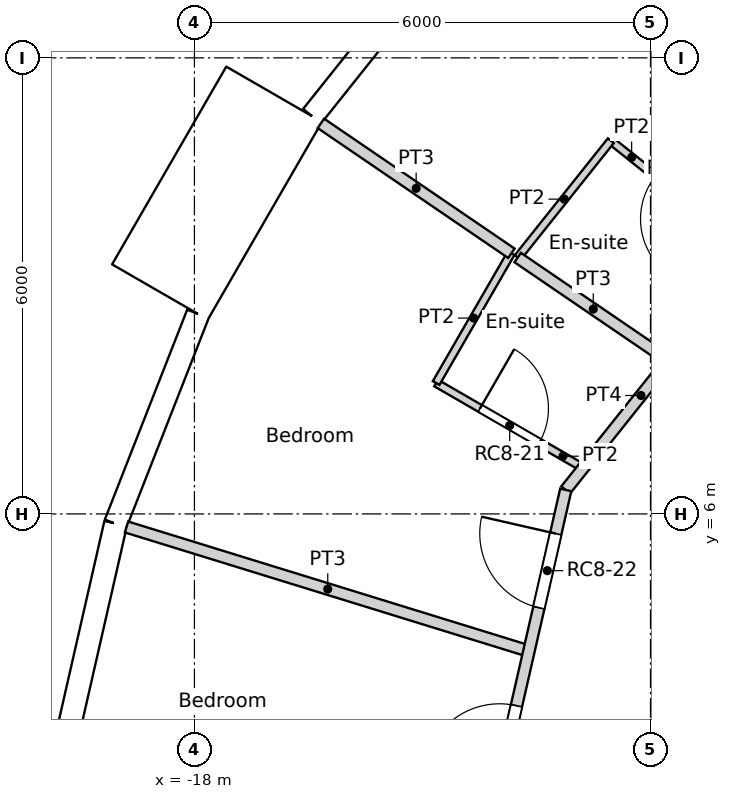
"""IFC4 building model, lengths in metres.
Left out: names, types, materials, properties, quantities, classifications, styles, units other than length and angle.
Written with IfcOpenShell. Run it as: python <this file> out.ifc"""

import sys

from ifc_helpers import new_model, si_unit, direction, frame, frame_2d, origin, origin_2d, place, context, subcontext, project, spatial, rectangle, circle, extrude, element, fill, save


model = new_model("IFC4")
c1 = context("Model", 3, precision=1e-05, world=origin(), true_north=direction((0.0, 1.0)))
c2 = subcontext(c1, "Body", "Model", "MODEL_VIEW")
j1 = project(units=[si_unit("LENGTHUNIT", "METRE"), si_unit("PLANEANGLEUNIT", "RADIAN")], contexts=[c1])
p1 = place(None, origin())
s1 = spatial("IfcSite", under=j1, at=p1, CompositionType="ELEMENT")
p2 = place(p1, origin())
s2 = spatial("IfcBuilding", under=s1, at=p2, CompositionType="ELEMENT")
p3 = place(p2, frame((0.0, 0.0, 305.4)))
s3 = spatial("IfcBuildingStorey", under=s2, at=p3, CompositionType="ELEMENT", Elevation=305.4)
p4 = place(p3, frame((-16.958, 8.167, 0.0), z_axis=(0.0, 0.0, 1.0), x_axis=(1.0, 0.0, 0.0)))
e1 = element("IfcColumn", 1, at=p4, inside=s3, PredefinedType="COLUMN", context=c2, shape_type="SweptSolid", body=[
    extrude(circle(Radius=0.45, at=origin_2d()), origin(), (0.0, 0.0, 1.0), 3.6),
])
p5 = place(p3, frame((-14.604, 13.55, 0.0), z_axis=(0.0, 0.0, 1.0), x_axis=(-0.623498236992, -0.781824755599, 0.0)))
e2 = element("IfcWall", 2, at=p5, inside=s3, PredefinedType="SOLIDWALL", context=c2, shape_type="SweptSolid", body=[
    extrude(rectangle(XDim=2.962, YDim=0.3, at=frame_2d((1.481, 0.0))), origin(), (0.0, 0.0, 1.0), 3.25),
])
p6 = place(p5, frame((1.481, 0.0, 1.55)))
e3 = element("IfcOpeningElement", 3, at=p6, cuts=e2, PredefinedType="OPENING", context=c2, shape_type="SweptSolid", body=[
    extrude(circle(Radius=0.9, at=origin_2d()), frame((0.0, 0.16, 0.0), z_axis=(0.0, -1.0, 0.0), x_axis=(1.0, 0.0, 0.0)), (0.0, 0.0, 1.0), 0.32),
])
p7 = place(p3, frame((-16.952, 11.52, -0.35), z_axis=(0.0, 0.0, 1.0), x_axis=(-0.499990139034, -0.866031096941, 0.0)))
e4 = element("IfcWall", 4, at=p7, inside=s3, PredefinedType="ELEMENTEDWALL", context=c2, shape_type="SweptSolid", body=[
    extrude(rectangle(XDim=3.0, YDim=1.45, at=frame_2d((1.5, 0.0))), origin(), (0.0, 0.0, 1.0), 3.6),
])
p8 = place(p7, frame((1.5, 0.0, 1.9)))
e5 = element("IfcOpeningElement", 5, at=p8, cuts=e4, PredefinedType="OPENING", context=c2, shape_type="SweptSolid", body=[
    extrude(circle(Radius=0.9, at=origin_2d()), frame((0.0, 0.735, 0.0), z_axis=(0.0, -1.0, 0.0), x_axis=(1.0, 0.0, 0.0)), (0.0, 0.0, 1.0), 1.47),
])
p9 = place(p3, frame((-17.955, 8.629, 0.0), z_axis=(0.0, 0.0, 1.0), x_axis=(-0.36530043032, -0.930889679612, 0.0)))
e6 = element("IfcWall", 6, at=p9, inside=s3, PredefinedType="SOLIDWALL", context=c2, shape_type="SweptSolid", body=[
    extrude(rectangle(XDim=2.962, YDim=0.3, at=frame_2d((1.481, 0.0))), origin(), (0.0, 0.0, 1.0), 2.8),
])
p10 = place(p9, frame((1.481, 0.0, 1.55)))
e7 = element("IfcOpeningElement", 7, at=p10, cuts=e6, PredefinedType="OPENING", context=c2, shape_type="SweptSolid", body=[
    extrude(circle(Radius=0.9, at=origin_2d()), frame((0.0, 0.16, 0.0), z_axis=(0.0, -1.0, 0.0), x_axis=(1.0, 0.0, 0.0)), (0.0, 0.0, 1.0), 0.32),
])
p11 = place(p3, frame((-19.037, 5.872, 0.0), z_axis=(0.0, 0.0, 1.0), x_axis=(-0.222529389789, -0.974925982155, 0.0)))
e8 = element("IfcWall", 8, at=p11, inside=s3, PredefinedType="SOLIDWALL", context=c2, shape_type="SweptSolid", body=[
    extrude(rectangle(XDim=2.962, YDim=0.3, at=frame_2d((1.481, 0.0))), origin(), (0.0, 0.0, 1.0), 3.25),
])
p12 = place(p11, frame((1.481, 0.0, 1.55)))
e9 = element("IfcOpeningElement", 9, at=p12, cuts=e8, PredefinedType="OPENING", context=c2, shape_type="SweptSolid", body=[
    extrude(circle(Radius=0.9, at=origin_2d()), frame((0.0, 0.16, 0.0), z_axis=(0.0, -1.0, 0.0), x_axis=(1.0, 0.0, 0.0)), (0.0, 0.0, 1.0), 0.32),
])
p13 = place(p3, frame((-13.115, 6.316, 0.0), z_axis=(0.0, 0.0, 1.0), x_axis=(0.623560523309, 0.781775078761, 0.0)))
e10 = element("IfcWall", 10, at=p13, inside=s3, PredefinedType="PARTITIONING", context=c2, shape_type="SweptSolid", body=[
    extrude(rectangle(XDim=3.177, YDim=0.15, at=frame_2d((1.589, 0.0))), origin(), (0.0, 0.0, 1.0), 3.25),
])
p14 = place(p3, frame((-14.557, 0.0, 0.0), z_axis=(0.0, 0.0, 1.0), x_axis=(0.222533159771, 0.974925121639, 0.0)))
e11 = element("IfcWall", 11, at=p14, inside=s3, PredefinedType="PARTITIONING", context=c2, shape_type="SweptSolid", body=[
    extrude(rectangle(XDim=6.478, YDim=0.15, at=frame_2d((3.239, 0.0))), origin(), (0.0, 0.0, 1.0), 3.25),
])
p15 = place(p14, frame((4.889, 0.0, 0.0)))
e12 = element("IfcOpeningElement", 12, at=p15, cuts=e11, PredefinedType="OPENING", context=c2, shape_type="SweptSolid", body=[
    extrude(rectangle(XDim=1.0, YDim=2.1, at=frame_2d((0.5, 1.05))), frame((0.0, 0.075, 0.0), z_axis=(0.0, -1.0, 0.0), x_axis=(1.0, 0.0, 0.0)), (0.0, 0.0, 1.0), 0.15),
])
p16 = place(p14, frame((2.567, 0.0, 0.0)))
e13 = element("IfcOpeningElement", 13, at=p16, cuts=e11, PredefinedType="OPENING", context=c2, shape_type="SweptSolid", body=[
    extrude(rectangle(XDim=1.0, YDim=2.1, at=frame_2d((0.5, 1.05))), frame((0.0, 0.075, 0.0), z_axis=(0.0, -1.0, 0.0), x_axis=(1.0, 0.0, 0.0)), (0.0, 0.0, 1.0), 0.15),
])
p17 = place(p3, frame((-12.327, 15.458, 0.0), z_axis=(0.0, 0.0, 1.0), x_axis=(0.623460949534, -0.781854490558, 0.0)))
e14 = element("IfcWall", 14, at=p17, inside=s3, PredefinedType="PARTITIONING", context=c2, shape_type="SweptSolid", body=[
    extrude(rectangle(XDim=5.214, YDim=0.15, at=frame_2d((2.607, 0.0))), origin(), (0.0, 0.0, 1.0), 3.25),
])
p18 = place(p3, frame((-12.522, 10.91, 0.0), z_axis=(0.0, 0.0, 1.0), x_axis=(0.781830263661, -0.623491330191, 0.0)))
e15 = element("IfcWall", 15, at=p18, inside=s3, PredefinedType="PARTITIONING", context=c2, shape_type="SweptSolid", body=[
    extrude(rectangle(XDim=2.401, YDim=0.1, at=frame_2d((1.2, 0.0))), origin(), (0.0, 0.0, 1.0), 3.25),
])
p19 = place(p18, frame((0.751, 0.0, 0.0)))
e16 = element("IfcOpeningElement", 16, at=p19, cuts=e15, PredefinedType="OPENING", context=c2, shape_type="SweptSolid", body=[
    extrude(rectangle(XDim=0.9, YDim=2.04, at=frame_2d((0.45, 1.02))), frame((0.0, 0.05, 0.0), z_axis=(0.0, -1.0, 0.0), x_axis=(1.0, 0.0, 0.0)), (0.0, 0.0, 1.0), 0.1),
])
p20 = place(p3, frame((-13.747, 9.373, 0.0), z_axis=(0.0, 0.0, 1.0), x_axis=(0.623330716607, 0.781958322249, 0.0)))
e17 = element("IfcWall", 17, at=p20, inside=s3, PredefinedType="PARTITIONING", context=c2, shape_type="SweptSolid", body=[
    extrude(rectangle(XDim=1.965, YDim=0.1, at=frame_2d((0.983, 0.0))), origin(), (0.0, 0.0, 1.0), 3.25),
])
p21 = place(p3, frame((-16.336, 11.138, 0.0), z_axis=(0.0, 0.0, 1.0), x_axis=(0.826159220299, -0.563436724678, 0.0)))
e18 = element("IfcWall", 18, at=p21, inside=s3, PredefinedType="PARTITIONING", context=c2, shape_type="SweptSolid", body=[
    extrude(rectangle(XDim=3.033, YDim=0.15, at=frame_2d((1.517, 0.0))), origin(), (0.0, 0.0, 1.0), 3.25),
])
p22 = place(p3, frame((-13.747, 9.373, 0.0), z_axis=(0.0, 0.0, 1.0), x_axis=(0.826135036312, -0.563472183677, 0.0)))
e19 = element("IfcWall", 19, at=p22, inside=s3, PredefinedType="PARTITIONING", context=c2, shape_type="SweptSolid", body=[
    extrude(rectangle(XDim=2.406, YDim=0.15, at=frame_2d((1.203, 0.0))), origin(), (0.0, 0.0, 1.0), 3.25),
])
p23 = place(p3, frame((-14.82, 7.722, 0.0), z_axis=(0.0, 0.0, 1.0), x_axis=(0.500143626598, 0.865942465048, 0.0)))
e20 = element("IfcWall", 20, at=p23, inside=s3, PredefinedType="PARTITIONING", context=c2, shape_type="SweptSolid", body=[
    extrude(rectangle(XDim=1.974, YDim=0.1, at=frame_2d((0.987, 0.0))), origin(), (0.0, 0.0, 1.0), 3.25),
])
p24 = place(p3, frame((-14.82, 7.722, 0.0), z_axis=(0.0, 0.0, 1.0), x_axis=(0.866076416361, -0.499911633214, 0.0)))
e21 = element("IfcWall", 21, at=p24, inside=s3, PredefinedType="PARTITIONING", context=c2, shape_type="SweptSolid", body=[
    extrude(rectangle(XDim=2.234, YDim=0.1, at=frame_2d((1.117, 0.0))), origin(), (0.0, 0.0, 1.0), 3.25),
])
p25 = place(p24, frame((0.667, 0.0, 0.0)))
e22 = element("IfcOpeningElement", 22, at=p25, cuts=e21, PredefinedType="OPENING", context=c2, shape_type="SweptSolid", body=[
    extrude(rectangle(XDim=0.9, YDim=2.04, at=frame_2d((0.45, 1.02))), frame((0.0, 0.05, 0.0), z_axis=(0.0, -1.0, 0.0), x_axis=(1.0, 0.0, 0.0)), (0.0, 0.0, 1.0), 0.1),
])
p26 = place(p3, frame((-18.893, 5.828, 0.0), z_axis=(0.0, 0.0, 1.0), x_axis=(0.955580602693, -0.294729896274, 0.0)))
e23 = element("IfcWall", 23, at=p26, inside=s3, PredefinedType="PARTITIONING", context=c2, shape_type="SweptSolid", body=[
    extrude(rectangle(XDim=5.54, YDim=0.15, at=frame_2d((2.77, 0.0))), origin(), (0.0, 0.0, 1.0), 3.25),
])
p27 = place(p6, origin())
e24 = element("IfcWindow", 24, at=p27, inside=s3, PartitioningType="SINGLE_PANEL", PredefinedType="WINDOW", context=c2, shape_type="SweptSolid", body=[
    extrude(circle(Radius=0.9, at=origin_2d()), frame((0.0, 0.12, 0.0), z_axis=(0.0, -1.0, 0.0), x_axis=(1.0, 0.0, 0.0)), (0.0, 0.0, 1.0), 0.1),
])
fill(e3, e24)
p28 = place(p8, origin())
e25 = element("IfcWindow", 25, at=p28, inside=s3, PartitioningType="SINGLE_PANEL", PredefinedType="WINDOW", context=c2, shape_type="SweptSolid", body=[
    extrude(circle(Radius=0.9, at=origin_2d()), frame((0.0, 0.695, 0.0), z_axis=(0.0, -1.0, 0.0), x_axis=(1.0, 0.0, 0.0)), (0.0, 0.0, 1.0), 0.1),
])
fill(e5, e25)
p29 = place(p10, origin())
e26 = element("IfcWindow", 26, at=p29, inside=s3, PartitioningType="SINGLE_PANEL", PredefinedType="WINDOW", context=c2, shape_type="SweptSolid", body=[
    extrude(circle(Radius=0.9, at=origin_2d()), frame((0.0, 0.12, 0.0), z_axis=(0.0, -1.0, 0.0), x_axis=(1.0, 0.0, 0.0)), (0.0, 0.0, 1.0), 0.1),
])
fill(e7, e26)
p30 = place(p12, origin())
e27 = element("IfcWindow", 27, at=p30, inside=s3, PartitioningType="SINGLE_PANEL", PredefinedType="WINDOW", context=c2, shape_type="SweptSolid", body=[
    extrude(circle(Radius=0.9, at=origin_2d()), frame((0.0, 0.12, 0.0), z_axis=(0.0, -1.0, 0.0), x_axis=(1.0, 0.0, 0.0)), (0.0, 0.0, 1.0), 0.1),
])
fill(e9, e27)
p31 = place(p25, origin())
e28 = element("IfcDoor", 28, at=p31, inside=s3, OperationType="SINGLE_SWING_LEFT", PredefinedType="DOOR", context=c2, shape_type="SweptSolid", body=[
    extrude(rectangle(XDim=0.9, YDim=2.04, at=frame_2d((0.45, 1.02))), frame((0.0, 0.025, 0.0), z_axis=(0.0, -1.0, 0.0), x_axis=(1.0, 0.0, 0.0)), (0.0, 0.0, 1.0), 0.05),
])
fill(e22, e28)
p32 = place(p15, origin())
e29 = element("IfcDoor", 29, at=p32, inside=s3, OperationType="SINGLE_SWING_RIGHT", PredefinedType="DOOR", context=c2, shape_type="SweptSolid", body=[
    extrude(rectangle(XDim=1.0, YDim=2.1, at=frame_2d((0.5, 1.05))), frame((0.0, 0.025, 0.0), z_axis=(0.0, -1.0, 0.0), x_axis=(1.0, 0.0, 0.0)), (0.0, 0.0, 1.0), 0.05),
])
fill(e12, e29)
p33 = place(p16, origin())
e30 = element("IfcDoor", 30, at=p33, inside=s3, OperationType="SINGLE_SWING_LEFT", PredefinedType="DOOR", context=c2, shape_type="SweptSolid", body=[
    extrude(rectangle(XDim=1.0, YDim=2.1, at=frame_2d((0.5, 1.05))), frame((0.0, 0.025, 0.0), z_axis=(0.0, -1.0, 0.0), x_axis=(1.0, 0.0, 0.0)), (0.0, 0.0, 1.0), 0.05),
])
fill(e13, e30)
save(model, sys.argv[1])
